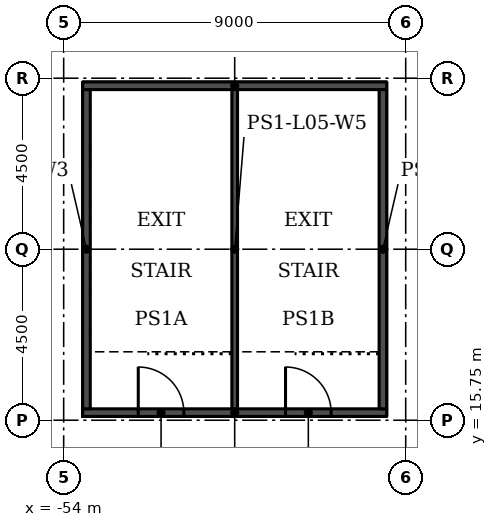
"""IFC4 building model, lengths in metres.
Left out: names, types, materials, properties, quantities, classifications, styles, units other than length and angle.
Written with IfcOpenShell. Run it as: python <this file> out.ifc"""

import sys

from ifc_helpers import new_model, si_unit, direction, frame, frame_2d, origin, place, context, subcontext, project, spatial, rectangle, extrude, element, fill, save


model = new_model("IFC4")
c1 = context("Model", 3, precision=1e-05, world=origin(), true_north=direction((0.0, 1.0)))
c2 = subcontext(c1, "Body", "Model", "MODEL_VIEW")
j1 = project(units=[si_unit("LENGTHUNIT", "METRE"), si_unit("PLANEANGLEUNIT", "RADIAN")], contexts=[c1])
p1 = place(None, origin())
s1 = spatial("IfcSite", under=j1, at=p1, CompositionType="ELEMENT")
p2 = place(p1, origin())
s2 = spatial("IfcBuilding", under=s1, at=p2, CompositionType="ELEMENT")
p3 = place(p2, frame((0.0, 0.0, 28.5)))
s3 = spatial("IfcBuildingStorey", under=s2, at=p3, CompositionType="ELEMENT", Elevation=28.5)
p4 = place(p3, frame((-53.5, 15.95, 0.0)))
e1 = element("IfcWall", 1, at=p4, inside=s3, PredefinedType="SHEAR", context=c2, shape_type="SweptSolid", body=[
    extrude(rectangle(XDim=8.0, YDim=0.2, at=frame_2d((4.0, 0.0))), origin(), (0.0, 0.0, 1.0), 2.8),
])
p5 = place(p4, frame((1.462, 0.0, 0.0)))
e2 = element("IfcOpeningElement", 2, at=p5, cuts=e1, PredefinedType="OPENING", context=c2, shape_type="SweptSolid", body=[
    extrude(rectangle(XDim=1.2, YDim=2.4, at=frame_2d((0.6, 1.2))), frame((0.0, 0.11, 0.0), z_axis=(0.0, -1.0, 0.0), x_axis=(1.0, 0.0, 0.0)), (0.0, 0.0, 1.0), 0.22),
])
p6 = place(p4, frame((5.337, 0.0, 0.0)))
e3 = element("IfcOpeningElement", 3, at=p6, cuts=e1, PredefinedType="OPENING", context=c2, shape_type="SweptSolid", body=[
    extrude(rectangle(XDim=1.2, YDim=2.4, at=frame_2d((0.6, 1.2))), frame((0.0, 0.11, 0.0), z_axis=(0.0, -1.0, 0.0), x_axis=(1.0, 0.0, 0.0)), (0.0, 0.0, 1.0), 0.22),
])
p7 = place(p3, frame((-53.5, 24.55, 0.0)))
e4 = element("IfcWall", 4, at=p7, inside=s3, PredefinedType="SHEAR", context=c2, shape_type="SweptSolid", body=[
    extrude(rectangle(XDim=8.0, YDim=0.2, at=frame_2d((4.0, 0.0))), origin(), (0.0, 0.0, 1.0), 2.8),
])
for number, where, z_axis, x_axis in (
    (5, (-53.4, 16.05, 0.0), (0.0, 0.0, 1.0), (0.0, 1.0, 0.0)),
    (6, (-45.6, 16.05, 0.0), (0.0, 0.0, 1.0), (0.0, 1.0, 0.0)),
):
    element("IfcWall", number, at=place(p3, frame(where, z_axis=z_axis, x_axis=x_axis)), inside=s3, PredefinedType="SHEAR", context=c2, shape_type="SweptSolid", body=[
        extrude(rectangle(XDim=8.4, YDim=0.2, at=frame_2d((4.2, 0.0))), origin(), (0.0, 0.0, 1.0), 2.8),
    ])
p8 = place(p3, frame((-49.5, 16.05, 0.0), z_axis=(0.0, 0.0, 1.0), x_axis=(0.0, 1.0, 0.0)))
e7 = element("IfcWall", 7, at=p8, inside=s3, PredefinedType="SHEAR", context=c2, shape_type="SweptSolid", body=[
    extrude(rectangle(XDim=8.4, YDim=0.15, at=frame_2d((4.2, 0.0))), origin(), (0.0, 0.0, 1.0), 2.8),
])
p9 = place(p5, origin())
e8 = element("IfcDoor", 8, at=p9, inside=s3, OperationType="SINGLE_SWING_LEFT", PredefinedType="DOOR", context=c2, shape_type="SweptSolid", body=[
    extrude(rectangle(XDim=1.2, YDim=2.4, at=frame_2d((0.6, 1.2))), frame((0.0, 0.025, 0.0), z_axis=(0.0, -1.0, 0.0), x_axis=(1.0, 0.0, 0.0)), (0.0, 0.0, 1.0), 0.05),
])
fill(e2, e8)
p10 = place(p6, origin())
e9 = element("IfcDoor", 9, at=p10, inside=s3, OperationType="SINGLE_SWING_RIGHT", PredefinedType="DOOR", context=c2, shape_type="SweptSolid", body=[
    extrude(rectangle(XDim=1.2, YDim=2.4, at=frame_2d((0.6, 1.2))), frame((0.0, 0.025, 0.0), z_axis=(0.0, -1.0, 0.0), x_axis=(1.0, 0.0, 0.0)), (0.0, 0.0, 1.0), 0.05),
])
fill(e3, e9)
save(model, sys.argv[1])
